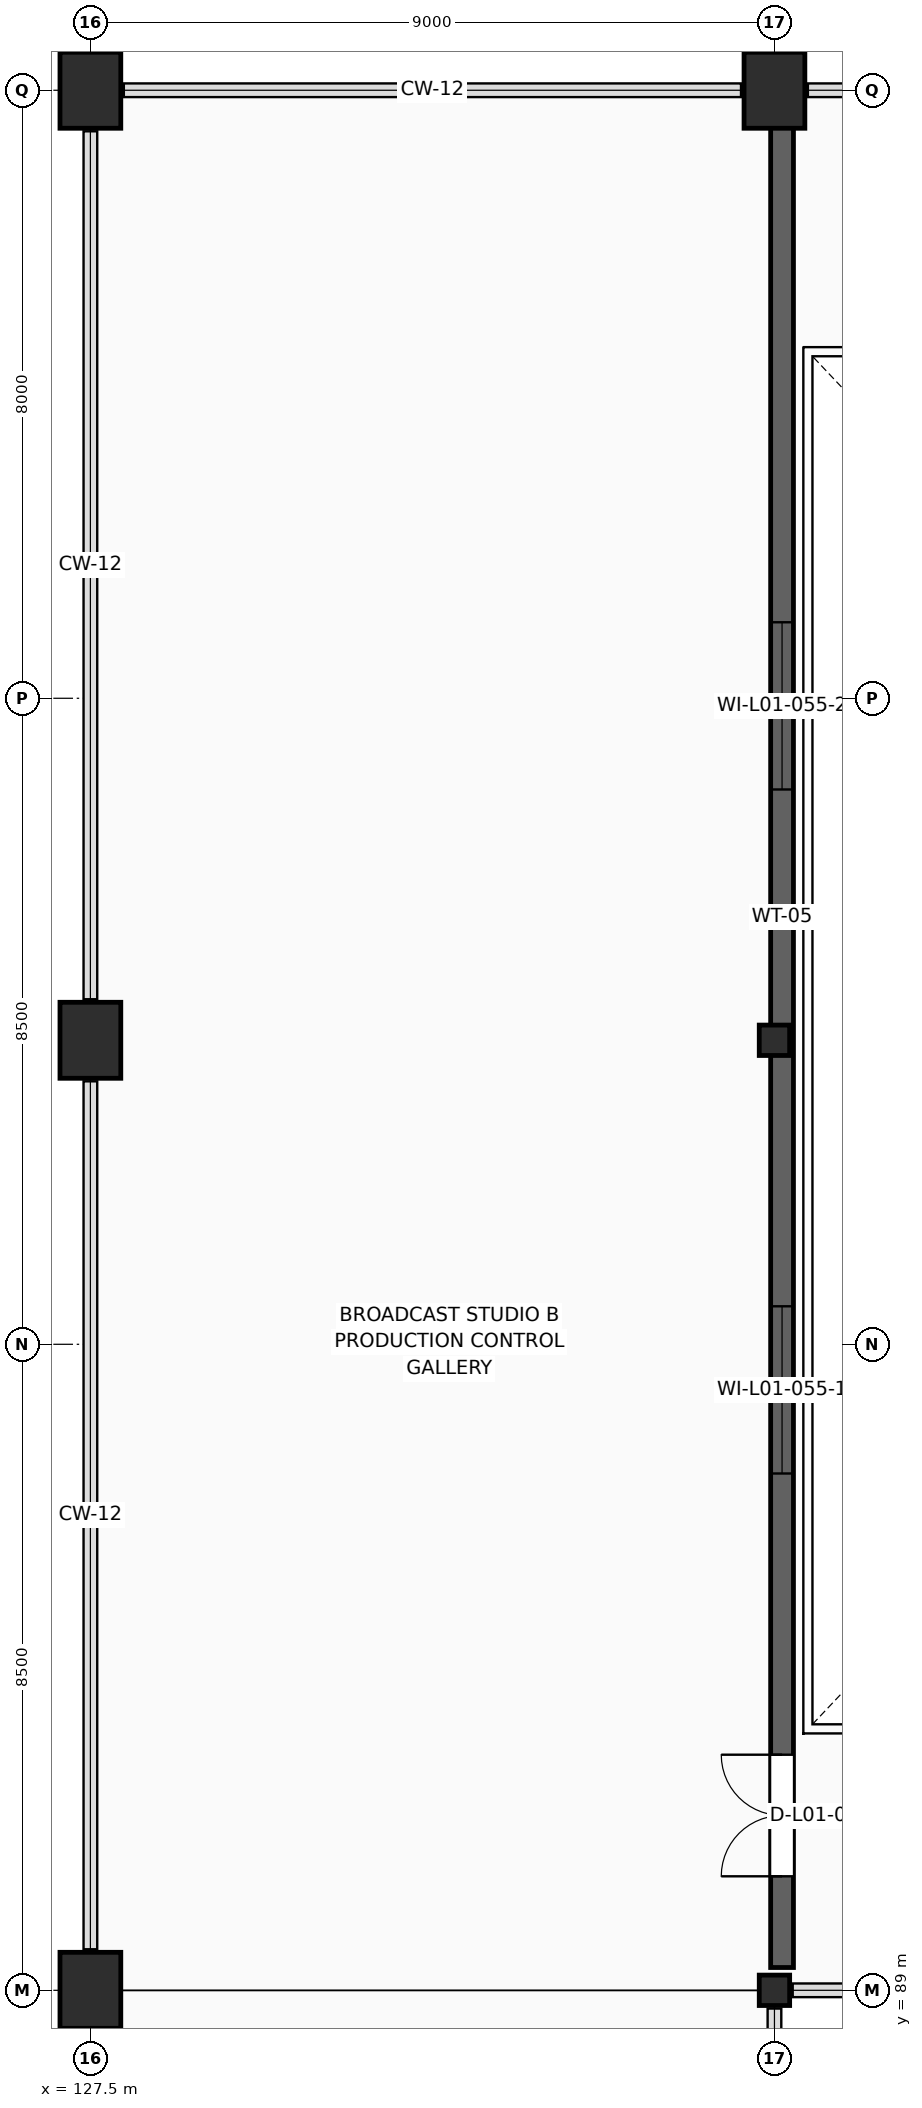
"""IFC4 building model, lengths in metres.
Left out: names, types, materials, properties, quantities, classifications, styles, units other than length and angle.
Written with IfcOpenShell. Run it as: python <this file> out.ifc"""

import sys

from ifc_helpers import new_model, si_unit, direction, frame, frame_2d, origin, origin_2d, place, context, subcontext, project, spatial, rectangle, hollow_rectangle, extrude, element, fill, save


model = new_model("IFC4")
c1 = context("Model", 3, precision=1e-05, world=origin(), true_north=direction((0.0, 1.0)))
c2 = subcontext(c1, "Body", "Model", "MODEL_VIEW")
j1 = project(units=[si_unit("LENGTHUNIT", "METRE"), si_unit("PLANEANGLEUNIT", "RADIAN")], contexts=[c1])
p1 = place(None, origin())
s1 = spatial("IfcSite", under=j1, at=p1, CompositionType="ELEMENT")
p2 = place(p1, origin())
s2 = spatial("IfcBuilding", under=s1, at=p2, CompositionType="ELEMENT")
p3 = place(p2, frame((0.0, 0.0, 5.4)))
s3 = spatial("IfcBuildingStorey", under=s2, at=p3, CompositionType="ELEMENT", Elevation=5.4)
for number, where, z_axis, x_axis in (
    (1, (127.5, 89.0, 0.0), (0.0, 0.0, 1.0), (1.0, 0.0, 0.0)),
    (2, (127.5, 101.5, 0.0), (0.0, 0.0, 1.0), (1.0, 0.0, 0.0)),
    (3, (127.5, 114.0, 0.0), (0.0, 0.0, 1.0), (1.0, 0.0, 0.0)),
):
    element("IfcColumn", number, at=place(p3, frame(where, z_axis=z_axis, x_axis=x_axis)), inside=s3, PredefinedType="COLUMN", context=c2, shape_type="SweptSolid", body=[
        extrude(rectangle(XDim=0.8, YDim=1.0, at=origin_2d()), origin(), (0.0, 0.0, 1.0), 4.7),
    ])
for number, where, z_axis, x_axis in (
    (4, (136.5, 89.0, 0.0), (0.0, 0.0, 1.0), (1.0, 0.0, 0.0)),
    (5, (136.5, 101.5, 0.0), (0.0, 0.0, 1.0), (1.0, 0.0, 0.0)),
):
    element("IfcColumn", number, at=place(p3, frame(where, z_axis=z_axis, x_axis=x_axis)), inside=s3, PredefinedType="COLUMN", context=c2, shape_type="SweptSolid", body=[
        extrude(hollow_rectangle(XDim=0.4, YDim=0.4, WallThickness=0.016, at=origin_2d()), origin(), (0.0, 0.0, 1.0), 4.7),
    ])
p4 = place(p3, frame((136.5, 114.0, 0.0), z_axis=(0.0, 0.0, 1.0), x_axis=(1.0, 0.0, 0.0)))
e6 = element("IfcColumn", 6, at=p4, inside=s3, PredefinedType="COLUMN", context=c2, shape_type="SweptSolid", body=[
    extrude(rectangle(XDim=0.8, YDim=1.0, at=origin_2d()), origin(), (0.0, 0.0, 1.0), 4.7),
])
p5 = place(p3, frame((136.6, 89.3, 0.0), z_axis=(0.0, 0.0, 1.0), x_axis=(0.0, 1.0, 0.0)))
e7 = element("IfcWall", 7, at=p5, inside=s3, PredefinedType="STANDARD", context=c2, shape_type="SweptSolid", body=[
    extrude(rectangle(XDim=24.3, YDim=0.3, at=frame_2d((12.15, 0.0))), origin(), (0.0, 0.0, 1.0), 4.5),
])
p6 = place(p5, frame((1.2, 0.0, 0.0)))
e8 = element("IfcOpeningElement", 8, at=p6, cuts=e7, PredefinedType="OPENING", context=c2, shape_type="SweptSolid", body=[
    extrude(rectangle(XDim=1.6, YDim=2.4, at=frame_2d((0.8, 1.2))), frame((0.0, 0.162, 0.0), z_axis=(0.0, -1.0, 0.0), x_axis=(1.0, 0.0, 0.0)), (0.0, 0.0, 1.0), 0.324),
])
p7 = place(p5, frame((6.5, 0.0, 1.05)))
e9 = element("IfcOpeningElement", 9, at=p7, cuts=e7, PredefinedType="OPENING", context=c2, shape_type="SweptSolid", body=[
    extrude(rectangle(XDim=2.2, YDim=1.2, at=frame_2d((1.1, 0.6))), frame((0.0, 0.162, 0.0), z_axis=(0.0, -1.0, 0.0), x_axis=(1.0, 0.0, 0.0)), (0.0, 0.0, 1.0), 0.324),
])
p8 = place(p5, frame((15.5, 0.0, 1.05)))
e10 = element("IfcOpeningElement", 10, at=p8, cuts=e7, PredefinedType="OPENING", context=c2, shape_type="SweptSolid", body=[
    extrude(rectangle(XDim=2.2, YDim=1.2, at=frame_2d((1.1, 0.6))), frame((0.0, 0.162, 0.0), z_axis=(0.0, -1.0, 0.0), x_axis=(1.0, 0.0, 0.0)), (0.0, 0.0, 1.0), 0.324),
])
p9 = place(p6, origin())
e11 = element("IfcDoor", 11, at=p9, inside=s3, OperationType="DOUBLE_DOOR_SINGLE_SWING", PredefinedType="DOOR", context=c2, shape_type="SweptSolid", body=[
    extrude(rectangle(XDim=1.6, YDim=2.4, at=frame_2d((0.8, 1.2))), frame((0.0, 0.025, 0.0), z_axis=(0.0, -1.0, 0.0), x_axis=(1.0, 0.0, 0.0)), (0.0, 0.0, 1.0), 0.05),
])
fill(e8, e11)
p10 = place(p7, origin())
e12 = element("IfcWindow", 12, at=p10, inside=s3, PartitioningType="SINGLE_PANEL", PredefinedType="WINDOW", context=c2, shape_type="SweptSolid", body=[
    extrude(rectangle(XDim=2.2, YDim=1.2, at=frame_2d((1.1, 0.6))), frame((0.0, 0.03, 0.0), z_axis=(0.0, -1.0, 0.0), x_axis=(1.0, 0.0, 0.0)), (0.0, 0.0, 1.0), 0.06),
])
fill(e9, e12)
p11 = place(p8, origin())
e13 = element("IfcWindow", 13, at=p11, inside=s3, PartitioningType="SINGLE_PANEL", PredefinedType="WINDOW", context=c2, shape_type="SweptSolid", body=[
    extrude(rectangle(XDim=2.2, YDim=1.2, at=frame_2d((1.1, 0.6))), frame((0.0, 0.03, 0.0), z_axis=(0.0, -1.0, 0.0), x_axis=(1.0, 0.0, 0.0)), (0.0, 0.0, 1.0), 0.06),
])
fill(e10, e13)
save(model, sys.argv[1])
